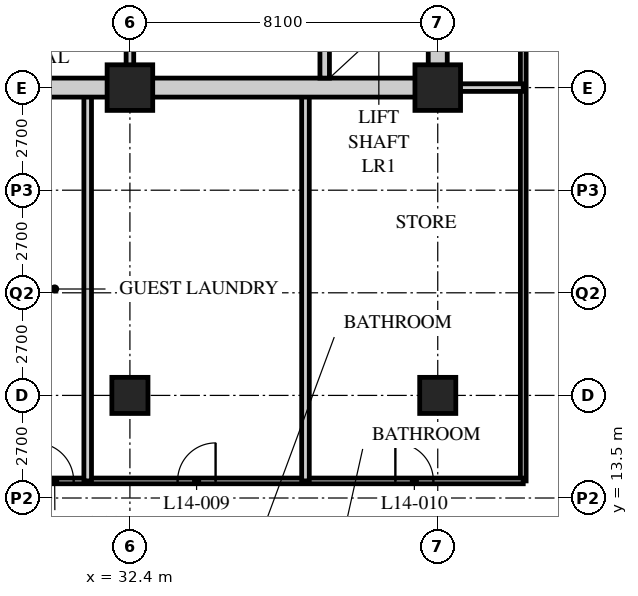
"""IFC4 building model, lengths in metres.
Left out: names, types, materials, properties, quantities, classifications, styles, units other than length and angle.
Written with IfcOpenShell. Run it as: python <this file> out.ifc"""

import sys

from ifc_helpers import new_model, si_unit, direction, frame, frame_2d, origin, origin_2d, place, context, subcontext, project, spatial, rectangle, hollow_rectangle, extrude, element, fill, save


model = new_model("IFC4")
c1 = context("Model", 3, precision=1e-05, world=origin(), true_north=direction((0.0, 1.0)))
c2 = subcontext(c1, "Body", "Model", "MODEL_VIEW")
j1 = project(units=[si_unit("LENGTHUNIT", "METRE"), si_unit("PLANEANGLEUNIT", "RADIAN")], contexts=[c1])
p1 = place(None, origin())
s1 = spatial("IfcSite", under=j1, at=p1, CompositionType="ELEMENT")
p2 = place(p1, origin())
s2 = spatial("IfcBuilding", under=s1, at=p2, CompositionType="ELEMENT")
p3 = place(p2, frame((0.0, 0.0, 60.2)))
s3 = spatial("IfcBuildingStorey", under=s2, at=p3, CompositionType="ELEMENT", Elevation=60.2)
p4 = place(p3, frame((32.4, 16.2, 0.0), z_axis=(0.0, 0.0, 1.0), x_axis=(1.0, 0.0, 0.0)))
e1 = element("IfcColumn", 1, at=p4, inside=s3, PredefinedType="COLUMN", context=c2, shape_type="SweptSolid", body=[
    extrude(hollow_rectangle(XDim=0.95, YDim=0.95, WallThickness=0.095, at=origin_2d()), origin(), (0.0, 0.0, 1.0), 3.4),
])
p5 = place(p3, frame((32.4, 24.3, 0.0), z_axis=(0.0, 0.0, 1.0), x_axis=(1.0, 0.0, 0.0)))
e2 = element("IfcColumn", 2, at=p5, inside=s3, PredefinedType="COLUMN", context=c2, shape_type="SweptSolid", body=[
    extrude(hollow_rectangle(XDim=1.2, YDim=1.2, WallThickness=0.12, at=origin_2d()), origin(), (0.0, 0.0, 1.0), 3.4),
])
p6 = place(p3, frame((40.5, 16.2, 0.0), z_axis=(0.0, 0.0, 1.0), x_axis=(1.0, 0.0, 0.0)))
e3 = element("IfcColumn", 3, at=p6, inside=s3, PredefinedType="COLUMN", context=c2, shape_type="SweptSolid", body=[
    extrude(hollow_rectangle(XDim=0.95, YDim=0.95, WallThickness=0.095, at=origin_2d()), origin(), (0.0, 0.0, 1.0), 3.4),
])
p7 = place(p3, frame((40.5, 24.3, 0.0), z_axis=(0.0, 0.0, 1.0), x_axis=(1.0, 0.0, 0.0)))
e4 = element("IfcColumn", 4, at=p7, inside=s3, PredefinedType="COLUMN", context=c2, shape_type="SweptSolid", body=[
    extrude(hollow_rectangle(XDim=1.2, YDim=1.2, WallThickness=0.12, at=origin_2d()), origin(), (0.0, 0.0, 1.0), 3.4),
])
p8 = place(p3, frame((42.75, 13.95, 0.0), z_axis=(0.0, 0.0, 1.0), x_axis=(0.0, 1.0, 0.0)))
e5 = element("IfcWall", 5, at=p8, inside=s3, PredefinedType="PARTITIONING", context=c2, shape_type="SweptSolid", body=[
    extrude(rectangle(XDim=26.55, YDim=0.15, at=frame_2d((13.275, 0.0))), origin(), (0.0, 0.0, 1.0), 3.19),
])
p9 = place(p8, frame((13.9, 0.0, 0.0)))
e6 = element("IfcOpeningElement", 6, at=p9, cuts=e5, PredefinedType="OPENING", context=c2, shape_type="SweptSolid", body=[
    extrude(rectangle(XDim=1.0, YDim=2.1, at=frame_2d((0.5, 1.05))), frame((0.0, 0.085, 0.0), z_axis=(0.0, -1.0, 0.0), x_axis=(1.0, 0.0, 0.0)), (0.0, 0.0, 1.0), 0.17),
])
p10 = place(p8, frame((22.0, 0.0, 0.0)))
e7 = element("IfcOpeningElement", 7, at=p10, cuts=e5, PredefinedType="OPENING", context=c2, shape_type="SweptSolid", body=[
    extrude(rectangle(XDim=1.0, YDim=2.1, at=frame_2d((0.5, 1.05))), frame((0.0, 0.085, 0.0), z_axis=(0.0, -1.0, 0.0), x_axis=(1.0, 0.0, 0.0)), (0.0, 0.0, 1.0), 0.17),
])
p11 = place(p3, frame((29.56, 13.95, 0.0), z_axis=(0.0, 0.0, 1.0), x_axis=(1.0, 0.0, 0.0)))
e8 = element("IfcWall", 8, at=p11, inside=s3, PredefinedType="PARTITIONING", context=c2, shape_type="SweptSolid", body=[
    extrude(rectangle(XDim=13.19, YDim=0.15, at=frame_2d((6.595, 0.0))), origin(), (0.0, 0.0, 1.0), 3.19),
])
p12 = place(p11, frame((0.36, 0.0, 0.0)))
e9 = element("IfcOpeningElement", 9, at=p12, cuts=e8, PredefinedType="OPENING", context=c2, shape_type="SweptSolid", body=[
    extrude(rectangle(XDim=1.0, YDim=2.1, at=frame_2d((0.5, 1.05))), frame((0.0, 0.085, 0.0), z_axis=(0.0, -1.0, 0.0), x_axis=(1.0, 0.0, 0.0)), (0.0, 0.0, 1.0), 0.17),
])
p13 = place(p11, frame((4.094, 0.0, 0.0)))
e10 = element("IfcOpeningElement", 10, at=p13, cuts=e8, PredefinedType="OPENING", context=c2, shape_type="SweptSolid", body=[
    extrude(rectangle(XDim=1.0, YDim=2.1, at=frame_2d((0.5, 1.05))), frame((0.0, 0.085, 0.0), z_axis=(0.0, -1.0, 0.0), x_axis=(1.0, 0.0, 0.0)), (0.0, 0.0, 1.0), 0.17),
])
p14 = place(p11, frame((9.825, 0.0, 0.0)))
e11 = element("IfcOpeningElement", 11, at=p14, cuts=e8, PredefinedType="OPENING", context=c2, shape_type="SweptSolid", body=[
    extrude(rectangle(XDim=1.0, YDim=2.1, at=frame_2d((0.5, 1.05))), frame((0.0, 0.085, 0.0), z_axis=(0.0, -1.0, 0.0), x_axis=(1.0, 0.0, 0.0)), (0.0, 0.0, 1.0), 0.17),
])
for number, where, z_axis, x_axis in (
    (12, (31.289, 13.95, 0.0), (0.0, 0.0, 1.0), (0.0, 1.0, 0.0)),
    (13, (37.02, 13.95, 0.0), (0.0, 0.0, 1.0), (0.0, 1.0, 0.0)),
):
    element("IfcWall", number, at=place(p3, frame(where, z_axis=z_axis, x_axis=x_axis)), inside=s3, PredefinedType="SOLIDWALL", context=c2, shape_type="SweptSolid", body=[
        extrude(rectangle(XDim=10.35, YDim=0.2, at=frame_2d((5.175, 0.0))), origin(), (0.0, 0.0, 1.0), 3.19),
    ])
p15 = place(p3, frame((40.5, 24.3, 0.0), z_axis=(0.0, 0.0, 1.0), x_axis=(1.0, 0.0, 0.0)))
e14 = element("IfcWall", 14, at=p15, inside=s3, PredefinedType="SOLIDWALL", context=c2, shape_type="SweptSolid", body=[
    extrude(rectangle(XDim=2.25, YDim=0.2, at=frame_2d((1.125, 0.0))), origin(), (0.0, 0.0, 1.0), 2.578),
])
p16 = place(p3, frame((15.95, 24.3, 0.0), z_axis=(0.0, 0.0, 1.0), x_axis=(1.0, 0.0, 0.0)))
e15 = element("IfcWall", 15, at=p16, inside=s3, PredefinedType="SOLIDWALL", context=c2, shape_type="SweptSolid", body=[
    extrude(rectangle(XDim=24.8, YDim=0.5, at=frame_2d((12.4, 0.0))), origin(), (0.0, 0.0, 1.0), 2.54),
])
p17 = place(p16, frame((11.5, 0.0, 0.0)))
e16 = element("IfcOpeningElement", 16, at=p17, cuts=e15, PredefinedType="OPENING", context=c2, shape_type="SweptSolid", body=[
    extrude(rectangle(XDim=1.8, YDim=2.4, at=frame_2d((0.9, 1.2))), frame((0.0, 0.26, 0.0), z_axis=(0.0, -1.0, 0.0), x_axis=(1.0, 0.0, 0.0)), (0.0, 0.0, 1.0), 0.52),
])
p18 = place(p3, frame((40.5, 24.55, 0.0), z_axis=(0.0, 0.0, 1.0), x_axis=(0.0, 1.0, 0.0)))
e17 = element("IfcWall", 17, at=p18, inside=s3, PredefinedType="SOLIDWALL", context=c2, shape_type="SweptSolid", body=[
    extrude(rectangle(XDim=15.7, YDim=0.5, at=frame_2d((7.85, 0.0))), origin(), (0.0, 0.0, 1.0), 2.578),
])
p19 = place(p3, frame((37.525, 24.55, 0.0), z_axis=(0.0, 0.0, 1.0), x_axis=(0.0, 1.0, 0.0)))
e18 = element("IfcWall", 18, at=p19, inside=s3, PredefinedType="SOLIDWALL", context=c2, shape_type="SweptSolid", body=[
    extrude(rectangle(XDim=7.75, YDim=0.25, at=frame_2d((3.875, 0.0))), origin(), (0.0, 0.0, 1.0), 3.19),
])
p20 = place(p3, frame((32.4, 24.55, 0.0), z_axis=(0.0, 0.0, 1.0), x_axis=(0.0, 1.0, 0.0)))
e19 = element("IfcWall", 19, at=p20, inside=s3, PredefinedType="PARTITIONING", context=c2, shape_type="SweptSolid", body=[
    extrude(rectangle(XDim=7.75, YDim=0.2, at=frame_2d((3.875, 0.0))), origin(), (0.0, 0.0, 1.0), 2.578),
])
p21 = place(p20, frame((1.4, 0.0, 0.0)))
e20 = element("IfcOpeningElement", 20, at=p21, cuts=e19, PredefinedType="OPENING", context=c2, shape_type="SweptSolid", body=[
    extrude(rectangle(XDim=0.9, YDim=2.1, at=frame_2d((0.45, 1.05))), frame((0.0, 0.11, 0.0), z_axis=(0.0, -1.0, 0.0), x_axis=(1.0, 0.0, 0.0)), (0.0, 0.0, 1.0), 0.22),
])
p22 = place(p20, frame((5.35, 0.0, 0.0)))
e21 = element("IfcOpeningElement", 21, at=p22, cuts=e19, PredefinedType="OPENING", context=c2, shape_type="SweptSolid", body=[
    extrude(rectangle(XDim=0.9, YDim=2.1, at=frame_2d((0.45, 1.05))), frame((0.0, 0.11, 0.0), z_axis=(0.0, -1.0, 0.0), x_axis=(1.0, 0.0, 0.0)), (0.0, 0.0, 1.0), 0.22),
])
p23 = place(p12, origin())
e22 = element("IfcDoor", 22, at=p23, inside=s3, OperationType="SINGLE_SWING_LEFT", PredefinedType="DOOR", context=c2, shape_type="SweptSolid", body=[
    extrude(rectangle(XDim=1.0, YDim=2.1, at=frame_2d((0.5, 1.05))), frame((0.0, 0.025, 0.0), z_axis=(0.0, -1.0, 0.0), x_axis=(1.0, 0.0, 0.0)), (0.0, 0.0, 1.0), 0.05),
])
fill(e9, e22)
p24 = place(p13, origin())
e23 = element("IfcDoor", 23, at=p24, inside=s3, OperationType="SINGLE_SWING_RIGHT", PredefinedType="DOOR", context=c2, shape_type="SweptSolid", body=[
    extrude(rectangle(XDim=1.0, YDim=2.1, at=frame_2d((0.5, 1.05))), frame((0.0, 0.025, 0.0), z_axis=(0.0, -1.0, 0.0), x_axis=(1.0, 0.0, 0.0)), (0.0, 0.0, 1.0), 0.05),
])
fill(e10, e23)
p25 = place(p14, origin())
e24 = element("IfcDoor", 24, at=p25, inside=s3, OperationType="SINGLE_SWING_LEFT", PredefinedType="DOOR", context=c2, shape_type="SweptSolid", body=[
    extrude(rectangle(XDim=1.0, YDim=2.1, at=frame_2d((0.5, 1.05))), frame((0.0, 0.025, 0.0), z_axis=(0.0, -1.0, 0.0), x_axis=(1.0, 0.0, 0.0)), (0.0, 0.0, 1.0), 0.05),
])
fill(e11, e24)
save(model, sys.argv[1])
